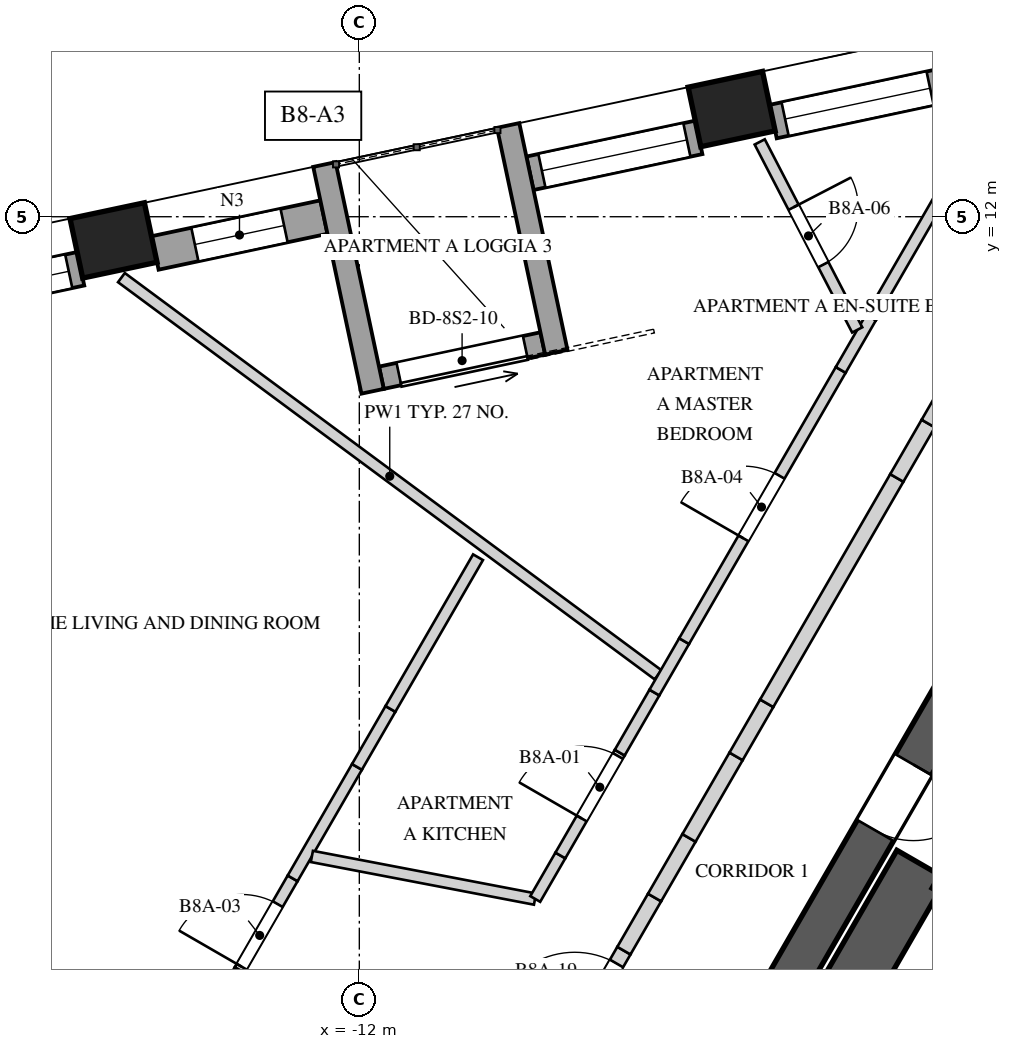
"""IFC4 building model, lengths in metres.
Left out: names, types, materials, properties, quantities, classifications, styles, units other than length and angle.
Written with IfcOpenShell. Run it as: python <this file> out.ifc"""

import sys

from ifc_helpers import new_model, si_unit, direction, frame, frame_2d, origin, origin_2d, place, context, subcontext, project, spatial, polyline, rectangle, outline, extrude, element, fill, save


model = new_model("IFC4")
c1 = context("Model", 3, precision=1e-05, world=origin(), true_north=direction((0.0, 1.0)))
c2 = subcontext(c1, "Body", "Model", "MODEL_VIEW")
j1 = project(units=[si_unit("LENGTHUNIT", "METRE"), si_unit("PLANEANGLEUNIT", "RADIAN")], contexts=[c1])
p1 = place(None, origin())
s1 = spatial("IfcSite", under=j1, at=p1, CompositionType="ELEMENT")
p2 = place(p1, origin())
s2 = spatial("IfcBuilding", under=s1, at=p2, CompositionType="ELEMENT")
p3 = place(p2, frame((0.0, 0.0, 320.4)))
s3 = spatial("IfcBuildingStorey", under=s2, at=p3, CompositionType="ELEMENT", Elevation=320.4)
p4 = place(p3, frame((-1.285, 10.725, 0.0), z_axis=(0.0, 0.0, 1.0), x_axis=(-0.499994590896, -0.86602852671, 0.0)))
e1 = element("IfcWall", 1, at=p4, inside=s3, PredefinedType="SHEAR", context=c2, shape_type="SweptSolid", body=[
    extrude(rectangle(XDim=17.292, YDim=0.55, at=frame_2d((8.646, 0.0))), origin(), (0.0, 0.0, 1.0), 4.0),
])
p5 = place(p4, frame((6.851, 0.0, 0.0)))
e2 = element("IfcOpeningElement", 2, at=p5, cuts=e1, PredefinedType="OPENING", context=c2, shape_type="SweptSolid", body=[
    extrude(rectangle(XDim=1.0, YDim=2.4, at=frame_2d((0.5, 1.2))), frame((0.0, 0.285, 0.0), z_axis=(0.0, -1.0, 0.0), x_axis=(1.0, 0.0, 0.0)), (0.0, 0.0, 1.0), 0.57),
])
p6 = place(p4, frame((15.089, 0.0, 0.0)))
e3 = element("IfcOpeningElement", 3, at=p6, cuts=e1, PredefinedType="OPENING", context=c2, shape_type="SweptSolid", body=[
    extrude(rectangle(XDim=0.8, YDim=2.1, at=frame_2d((0.4, 1.05))), frame((0.0, 0.285, 0.0), z_axis=(0.0, -1.0, 0.0), x_axis=(1.0, 0.0, 0.0)), (0.0, 0.0, 1.0), 0.57),
])
for number, where, z_axis, x_axis in (
    (4, (-7.102, 13.417, -0.35), (0.0, 0.0, 1.0), (-0.978, -0.208, 0.0)),
    (5, (-15.234, 11.688, -0.35), (0.0, 0.0, 1.0), (-0.978, -0.208, 0.0)),
):
    element("IfcColumn", number, at=place(p3, frame(where, z_axis=z_axis, x_axis=x_axis)), inside=s3, PredefinedType="COLUMN", context=c2, shape_type="SweptSolid", body=[
        extrude(rectangle(XDim=1.0, YDim=0.8, at=origin_2d()), origin(), (0.0, 0.0, 1.0), 4.35),
    ])
p7 = place(p3, frame((0.599, 14.772, 0.0), z_axis=(0.0, 0.0, 1.0), x_axis=(-0.978151299843, -0.207894287118, 0.0)))
e6 = element("IfcWall", 6, at=p7, inside=s3, PredefinedType="SOLIDWALL", context=c2, shape_type="SweptSolid", body=[
    extrude(rectangle(XDim=7.314, YDim=0.45, at=frame_2d((3.657, 0.0))), origin(), (0.0, 0.0, 1.0), 3.3),
])
p8 = place(p7, frame((0.161, 0.0, 0.4)))
e7 = element("IfcOpeningElement", 7, at=p8, cuts=e6, PredefinedType="OPENING", context=c2, shape_type="SweptSolid", body=[
    extrude(rectangle(XDim=1.95, YDim=2.75, at=frame_2d((0.975, 1.375))), frame((0.0, 0.235, 0.0), z_axis=(0.0, -1.0, 0.0), x_axis=(1.0, 0.0, 0.0)), (0.0, 0.0, 1.0), 0.47),
])
p9 = place(p7, frame((2.682, 0.0, 0.4)))
e8 = element("IfcOpeningElement", 8, at=p9, cuts=e6, PredefinedType="OPENING", context=c2, shape_type="SweptSolid", body=[
    extrude(rectangle(XDim=1.95, YDim=2.75, at=frame_2d((0.975, 1.375))), frame((0.0, 0.235, 0.0), z_axis=(0.0, -1.0, 0.0), x_axis=(1.0, 0.0, 0.0)), (0.0, 0.0, 1.0), 0.47),
])
p10 = place(p7, frame((5.203, 0.0, 0.4)))
e9 = element("IfcOpeningElement", 9, at=p10, cuts=e6, PredefinedType="OPENING", context=c2, shape_type="SweptSolid", body=[
    extrude(rectangle(XDim=1.95, YDim=2.75, at=frame_2d((0.975, 1.375))), frame((0.0, 0.235, 0.0), z_axis=(0.0, -1.0, 0.0), x_axis=(1.0, 0.0, 0.0)), (0.0, 0.0, 1.0), 0.47),
])
p11 = place(p3, frame((-7.533, 13.044, 0.0), z_axis=(0.0, 0.0, 1.0), x_axis=(-0.978153386925, -0.207884467067, 0.0)))
e10 = element("IfcWall", 10, at=p11, inside=s3, PredefinedType="SOLIDWALL", context=c2, shape_type="SweptSolid", body=[
    extrude(rectangle(XDim=2.271, YDim=0.45, at=frame_2d((1.136, 0.0))), origin(), (0.0, 0.0, 1.0), 3.3),
])
p12 = place(p11, frame((0.161, 0.0, 0.4)))
e11 = element("IfcOpeningElement", 11, at=p12, cuts=e10, PredefinedType="OPENING", context=c2, shape_type="SweptSolid", body=[
    extrude(rectangle(XDim=1.95, YDim=2.75, at=frame_2d((0.975, 1.375))), frame((0.0, 0.235, 0.0), z_axis=(0.0, -1.0, 0.0), x_axis=(1.0, 0.0, 0.0)), (0.0, 0.0, 1.0), 0.47),
])
p13 = place(p3, frame((-12.466, 11.995, 0.0), z_axis=(0.0, 0.0, 1.0), x_axis=(-0.978153386925, -0.207884467067, 0.0)))
e12 = element("IfcWall", 12, at=p13, inside=s3, PredefinedType="SOLIDWALL", context=c2, shape_type="SweptSolid", body=[
    extrude(rectangle(XDim=2.271, YDim=0.45, at=frame_2d((1.136, 0.0))), origin(), (0.0, 0.0, 1.0), 3.3),
])
p14 = place(p13, frame((0.536, 0.0, 0.4)))
e13 = element("IfcOpeningElement", 13, at=p14, cuts=e12, PredefinedType="OPENING", context=c2, shape_type="SweptSolid", body=[
    extrude(rectangle(XDim=1.2, YDim=2.75, at=frame_2d((0.6, 1.375))), frame((0.0, 0.235, 0.0), z_axis=(0.0, -1.0, 0.0), x_axis=(1.0, 0.0, 0.0)), (0.0, 0.0, 1.0), 0.47),
])
p15 = place(p3, frame((-15.666, 11.315, 0.0), z_axis=(0.0, 0.0, 1.0), x_axis=(-0.978148740936, -0.207906326516, 0.0)))
e14 = element("IfcWall", 14, at=p15, inside=s3, PredefinedType="SOLIDWALL", context=c2, shape_type="SweptSolid", body=[
    extrude(rectangle(XDim=2.271, YDim=0.45, at=frame_2d((1.135, 0.0))), origin(), (0.0, 0.0, 1.0), 3.3),
])
p16 = place(p15, frame((0.161, 0.0, 0.4)))
e15 = element("IfcOpeningElement", 15, at=p16, cuts=e14, PredefinedType="OPENING", context=c2, shape_type="SweptSolid", body=[
    extrude(rectangle(XDim=1.95, YDim=2.75, at=frame_2d((0.975, 1.375))), frame((0.0, 0.235, 0.0), z_axis=(0.0, -1.0, 0.0), x_axis=(1.0, 0.0, 0.0)), (0.0, 0.0, 1.0), 0.47),
])
p17 = place(p3, frame((-9.586, 10.333, 0.0), z_axis=(0.0, 0.0, 1.0), x_axis=(-0.978148276005, -0.207908513891, 0.0)))
e16 = element("IfcWall", 16, at=p17, inside=s3, PredefinedType="SOLIDWALL", context=c2, shape_type="SweptSolid", body=[
    extrude(rectangle(XDim=2.171, YDim=0.3, at=frame_2d((1.085, 0.0))), origin(), (0.0, 0.0, 1.0), 3.3),
])
p18 = place(p17, frame((0.236, 0.0, 0.0)))
e17 = element("IfcOpeningElement", 17, at=p18, cuts=e16, PredefinedType="OPENING", context=c2, shape_type="SweptSolid", body=[
    extrude(rectangle(XDim=1.7, YDim=2.5, at=frame_2d((0.85, 1.25))), frame((0.0, 0.16, 0.0), z_axis=(0.0, -1.0, 0.0), x_axis=(1.0, 0.0, 0.0)), (0.0, 0.0, 1.0), 0.32),
])
for number, where, z_axis, x_axis in (
    (18, (-10.042, 13.201, 0.0), (0.0, 0.0, 1.0), (0.208, -0.978, 0.0)),
    (19, (-12.459, 12.687, 0.0), (0.0, 0.0, 1.0), (0.208, -0.978, 0.0)),
):
    element("IfcWall", number, at=place(p3, frame(where, z_axis=z_axis, x_axis=x_axis)), inside=s3, PredefinedType="SOLIDWALL", context=c2, shape_type="SweptSolid", body=[
        extrude(rectangle(XDim=3.05, YDim=0.3, at=frame_2d((1.525, 0.0))), origin(), (0.0, 0.0, 1.0), 3.3),
    ])
p19 = place(p3, frame((-4.993, -2.648, 0.0), z_axis=(0.0, 0.0, 1.0), x_axis=(0.499996545922, 0.866027397988, 0.0)))
e20 = element("IfcWall", 20, at=p19, inside=s3, PredefinedType="SOLIDWALL", context=c2, shape_type="SweptSolid", body=[
    extrude(rectangle(XDim=5.5, YDim=0.2, at=frame_2d((2.75, 0.0))), origin(), (0.0, 0.0, 1.0), 3.65),
])
p20 = place(p19, frame((2.275, 0.0, 0.0)))
e21 = element("IfcOpeningElement", 21, at=p20, cuts=e20, PredefinedType="OPENING", context=c2, shape_type="SweptSolid", body=[
    extrude(rectangle(XDim=0.95, YDim=2.4, at=frame_2d((0.475, 1.2))), frame((0.0, 0.11, 0.0), z_axis=(0.0, -1.0, 0.0), x_axis=(1.0, 0.0, 0.0)), (0.0, 0.0, 1.0), 0.22),
])
p21 = place(p3, frame((-4.603, 3.477, 0.0), z_axis=(0.0, 0.0, 1.0), x_axis=(-0.500015767406, -0.866016300277, 0.0)))
e22 = element("IfcWall", 22, at=p21, inside=s3, PredefinedType="SOLIDWALL", context=c2, shape_type="SweptSolid", body=[
    extrude(rectangle(XDim=5.5, YDim=0.75, at=frame_2d((2.75, 0.0))), origin(), (0.0, 0.0, 1.0), 3.65),
])
p22 = place(p3, frame((-2.38, 2.078, 0.0), z_axis=(0.0, 0.0, 1.0), x_axis=(-0.866061024631, 0.499938297808, 0.0)))
e23 = element("IfcWall", 23, at=p22, inside=s3, PredefinedType="SOLIDWALL", context=c2, shape_type="SweptSolid", body=[
    extrude(rectangle(XDim=2.35, YDim=0.2, at=frame_2d((1.175, 0.0))), origin(), (0.0, 0.0, 1.0), 3.65),
])
p23 = place(p3, frame((-15.13, 11.199, 0.0), z_axis=(0.0, 0.0, 1.0), x_axis=(0.80377624172, -0.594931721499, 0.0)))
e24 = element("IfcWall", 24, at=p23, inside=s3, PredefinedType="PARTITIONING", context=c2, shape_type="SweptSolid", body=[
    extrude(rectangle(XDim=8.784, YDim=0.15, at=frame_2d((4.392, 0.0))), origin(), (0.0, 0.0, 1.0), 2.75),
])
p24 = place(p3, frame((-14.763, 0.03, 0.0), z_axis=(0.0, 0.0, 1.0), x_axis=(0.500045118629, 0.865999352965, 0.0)))
e25 = element("IfcWall", 25, at=p24, inside=s3, PredefinedType="PARTITIONING", context=c2, shape_type="SweptSolid", body=[
    extrude(rectangle(XDim=2.38, YDim=0.15, at=frame_2d((1.19, 0.0))), origin(), (0.0, 0.0, 1.0), 3.65),
])
p25 = place(p3, frame((-13.573, 2.09, 0.0), z_axis=(0.0, 0.0, 1.0), x_axis=(0.500026194733, 0.86601027972, 0.0)))
e26 = element("IfcWall", 26, at=p25, inside=s3, PredefinedType="PARTITIONING", context=c2, shape_type="SweptSolid", body=[
    extrude(outline(polyline([(0.0, 0.0), (1.392, 0.0), (1.392, 2.55), (0.474, 2.55), (0.474, 3.65), (0.0, 3.65), (0.0, 0.0)])), frame((0.0, 0.075, 0.0), z_axis=(0.0, -1.0, 0.0), x_axis=(1.0, 0.0, 0.0)), (0.0, 0.0, 1.0), 0.15),
])
p26 = place(p25, frame((0.05, 0.0, 0.0)))
e27 = element("IfcOpeningElement", 27, at=p26, cuts=e26, PredefinedType="OPENING", context=c2, shape_type="SweptSolid", body=[
    extrude(rectangle(XDim=0.95, YDim=2.4, at=frame_2d((0.475, 1.2))), frame((0.0, 0.085, 0.0), z_axis=(0.0, -1.0, 0.0), x_axis=(1.0, 0.0, 0.0)), (0.0, 0.0, 1.0), 0.17),
])
p27 = place(p3, frame((-12.877, 3.295, 0.0), z_axis=(0.0, 0.0, 1.0), x_axis=(0.499876388284, 0.86609675928, 0.0)))
e28 = element("IfcWall", 28, at=p27, inside=s3, PredefinedType="PARTITIONING", context=c2, shape_type="SweptSolid", body=[
    extrude(rectangle(XDim=1.693, YDim=0.15, at=frame_2d((0.847, 0.0))), origin(), (0.0, 0.0, 1.0), 3.65),
])
p28 = place(p3, frame((-12.031, 4.762, 0.0), z_axis=(0.0, 0.0, 1.0), x_axis=(0.50019444547, 0.865913111531, 0.0)))
e29 = element("IfcWall", 29, at=p28, inside=s3, PredefinedType="PARTITIONING", context=c2, shape_type="SweptSolid", body=[
    extrude(rectangle(XDim=0.881, YDim=0.15, at=frame_2d((0.44, 0.0))), origin(), (0.0, 0.0, 1.0), 2.55),
])
p29 = place(p3, frame((-11.591, 5.524, 0.0), z_axis=(0.0, 0.0, 1.0), x_axis=(0.500012835235, 0.866017993231, 0.0)))
e30 = element("IfcWall", 30, at=p29, inside=s3, PredefinedType="PARTITIONING", context=c2, shape_type="SweptSolid", body=[
    extrude(rectangle(XDim=2.305, YDim=0.15, at=frame_2d((1.152, 0.0))), origin(), (0.0, 0.0, 1.0), 3.65),
])
p30 = place(p3, frame((-12.624, 3.584, 0.0), z_axis=(0.0, 0.0, 1.0), x_axis=(0.982222548554, -0.187720177693, 0.0)))
e31 = element("IfcWall", 31, at=p30, inside=s3, PredefinedType="PARTITIONING", context=c2, shape_type="SweptSolid", body=[
    extrude(rectangle(XDim=2.989, YDim=0.15, at=frame_2d((1.494, 0.0))), origin(), (0.0, 0.0, 1.0), 3.65),
])
p31 = place(p3, frame((-9.686, 3.024, 0.0), z_axis=(0.0, 0.0, 1.0), x_axis=(0.500191429871, 0.865914853484, 0.0)))
e32 = element("IfcWall", 32, at=p31, inside=s3, PredefinedType="PARTITIONING", context=c2, shape_type="SweptSolid", body=[
    extrude(rectangle(XDim=0.661, YDim=0.15, at=frame_2d((0.331, 0.0))), origin(), (0.0, 0.0, 1.0), 3.65),
])
p32 = place(p3, frame((-9.355, 3.597, 0.0), z_axis=(0.0, 0.0, 1.0), x_axis=(0.499988530825, 0.866032025414, 0.0)))
e33 = element("IfcWall", 33, at=p32, inside=s3, PredefinedType="PARTITIONING", context=c2, shape_type="SweptSolid", body=[
    extrude(outline(polyline([(0.0, 0.0), (1.562, 0.0), (1.562, 3.65), (0.881, 3.65), (0.881, 2.55), (0.0, 2.55), (0.0, 0.0)])), frame((0.0, 0.075, 0.0), z_axis=(0.0, -1.0, 0.0), x_axis=(1.0, 0.0, 0.0)), (0.0, 0.0, 1.0), 0.15),
])
p33 = place(p32, frame((0.562, 0.0, 0.0)))
e34 = element("IfcOpeningElement", 34, at=p33, cuts=e33, PredefinedType="OPENING", context=c2, shape_type="SweptSolid", body=[
    extrude(rectangle(XDim=0.95, YDim=2.4, at=frame_2d((0.475, 1.2))), frame((0.0, 0.085, 0.0), z_axis=(0.0, -1.0, 0.0), x_axis=(1.0, 0.0, 0.0)), (0.0, 0.0, 1.0), 0.17),
])
p34 = place(p3, frame((-8.574, 4.949, 0.0), z_axis=(0.0, 0.0, 1.0), x_axis=(0.500023511883, 0.866011828767, 0.0)))
e35 = element("IfcWall", 35, at=p34, inside=s3, PredefinedType="PARTITIONING", context=c2, shape_type="SweptSolid", body=[
    extrude(rectangle(XDim=0.913, YDim=0.15, at=frame_2d((0.456, 0.0))), origin(), (0.0, 0.0, 1.0), 3.65),
])
p35 = place(p3, frame((-8.118, 5.74, 0.0), z_axis=(0.0, 0.0, 1.0), x_axis=(0.500001804394, 0.866024362014, 0.0)))
e36 = element("IfcWall", 36, at=p35, inside=s3, PredefinedType="PARTITIONING", context=c2, shape_type="SweptSolid", body=[
    extrude(rectangle(XDim=0.782, YDim=0.15, at=frame_2d((0.391, 0.0))), origin(), (0.0, 0.0, 1.0), 2.75),
])
p36 = place(p3, frame((-7.727, 6.417, 0.0), z_axis=(0.0, 0.0, 1.0), x_axis=(0.50002680699, 0.866009926209, 0.0)))
e37 = element("IfcWall", 37, at=p36, inside=s3, PredefinedType="PARTITIONING", context=c2, shape_type="SweptSolid", body=[
    extrude(rectangle(XDim=4.12, YDim=0.15, at=frame_2d((2.06, 0.0))), origin(), (0.0, 0.0, 1.0), 3.65),
])
p37 = place(p36, frame((1.561, 0.0, 0.0)))
e38 = element("IfcOpeningElement", 38, at=p37, cuts=e37, PredefinedType="OPENING", context=c2, shape_type="SweptSolid", body=[
    extrude(rectangle(XDim=0.95, YDim=2.4, at=frame_2d((0.475, 1.2))), frame((0.0, 0.085, 0.0), z_axis=(0.0, -1.0, 0.0), x_axis=(1.0, 0.0, 0.0)), (0.0, 0.0, 1.0), 0.17),
])
p38 = place(p3, frame((-5.667, 9.985, 0.0), z_axis=(0.0, 0.0, 1.0), x_axis=(0.499961121316, 0.86604784924, 0.0)))
e39 = element("IfcWall", 39, at=p38, inside=s3, PredefinedType="PARTITIONING", context=c2, shape_type="SweptSolid", body=[
    extrude(rectangle(XDim=0.797, YDim=0.15, at=frame_2d((0.398, 0.0))), origin(), (0.0, 0.0, 1.0), 2.95),
])
p39 = place(p3, frame((-5.268, 10.675, 0.0), z_axis=(0.0, 0.0, 1.0), x_axis=(0.499956642393, 0.866050434864, 0.0)))
e40 = element("IfcWall", 40, at=p39, inside=s3, PredefinedType="PARTITIONING", context=c2, shape_type="SweptSolid", body=[
    extrude(rectangle(XDim=2.256, YDim=0.15, at=frame_2d((1.128, 0.0))), origin(), (0.0, 0.0, 1.0), 3.65),
])
p40 = place(p3, frame((-6.732, 12.984, 0.0), z_axis=(0.0, 0.0, 1.0), x_axis=(0.460309491074, -0.887758510197, 0.0)))
e41 = element("IfcWall", 41, at=p40, inside=s3, PredefinedType="PARTITIONING", context=c2, shape_type="SweptSolid", body=[
    extrude(rectangle(XDim=2.786, YDim=0.15, at=frame_2d((1.393, 0.0))), origin(), (0.0, 0.0, 1.0), 2.95),
])
p41 = place(p40, frame((0.968, 0.0, 0.0)))
e42 = element("IfcOpeningElement", 42, at=p41, cuts=e41, PredefinedType="OPENING", context=c2, shape_type="SweptSolid", body=[
    extrude(rectangle(XDim=0.85, YDim=2.4, at=frame_2d((0.425, 1.2))), frame((0.0, 0.085, 0.0), z_axis=(0.0, -1.0, 0.0), x_axis=(1.0, 0.0, 0.0)), (0.0, 0.0, 1.0), 0.17),
])
p42 = place(p3, frame((-9.191, 1.18, 0.0), z_axis=(0.0, 0.0, 1.0), x_axis=(0.500005339912, 0.866022320763, 0.0)))
e43 = element("IfcWall", 43, at=p42, inside=s3, PredefinedType="SOLIDWALL", context=c2, shape_type="SweptSolid", body=[
    extrude(outline(polyline([(0.0, 0.0), (1.345, 0.0), (1.345, 2.55), (0.401, 2.55), (0.401, 3.65), (0.0, 3.65), (0.0, 0.0)])), frame((0.0, 0.1, 0.0), z_axis=(0.0, -1.0, 0.0), x_axis=(1.0, 0.0, 0.0)), (0.0, 0.0, 1.0), 0.2),
])
p43 = place(p42, frame((0.05, 0.0, 0.0)))
e44 = element("IfcOpeningElement", 44, at=p43, cuts=e43, PredefinedType="OPENING", context=c2, shape_type="SweptSolid", body=[
    extrude(rectangle(XDim=1.1, YDim=2.4, at=frame_2d((0.55, 1.2))), frame((0.0, 0.11, 0.0), z_axis=(0.0, -1.0, 0.0), x_axis=(1.0, 0.0, 0.0)), (0.0, 0.0, 1.0), 0.22),
])
p44 = place(p3, frame((-8.519, 2.344, 0.0), z_axis=(0.0, 0.0, 1.0), x_axis=(0.499914554297, 0.866074730264, 0.0)))
e45 = element("IfcWall", 45, at=p44, inside=s3, PredefinedType="SOLIDWALL", context=c2, shape_type="SweptSolid", body=[
    extrude(rectangle(XDim=0.807, YDim=0.2, at=frame_2d((0.403, 0.0))), origin(), (0.0, 0.0, 1.0), 3.65),
])
p45 = place(p3, frame((-8.116, 3.043, 0.0), z_axis=(0.0, 0.0, 1.0), x_axis=(0.499994660107, 0.866028486751, 0.0)))
e46 = element("IfcWall", 46, at=p45, inside=s3, PredefinedType="SOLIDWALL", context=c2, shape_type="SweptSolid", body=[
    extrude(rectangle(XDim=0.906, YDim=0.2, at=frame_2d((0.453, 0.0))), origin(), (0.0, 0.0, 1.0), 2.55),
])
p46 = place(p3, frame((-7.663, 3.828, 0.0), z_axis=(0.0, 0.0, 1.0), x_axis=(0.499955681623, 0.866050989499, 0.0)))
e47 = element("IfcWall", 47, at=p46, inside=s3, PredefinedType="SOLIDWALL", context=c2, shape_type="SweptSolid", body=[
    extrude(rectangle(XDim=1.238, YDim=0.2, at=frame_2d((0.619, 0.0))), origin(), (0.0, 0.0, 1.0), 3.65),
])
p47 = place(p3, frame((-7.044, 4.9, 0.0), z_axis=(0.0, 0.0, 1.0), x_axis=(0.500141487433, 0.865943700565, 0.0)))
e48 = element("IfcWall", 48, at=p47, inside=s3, PredefinedType="SOLIDWALL", context=c2, shape_type="SweptSolid", body=[
    extrude(rectangle(XDim=0.807, YDim=0.2, at=frame_2d((0.403, 0.0))), origin(), (0.0, 0.0, 1.0), 2.75),
])
p48 = place(p3, frame((-6.64, 5.599, 0.0), z_axis=(0.0, 0.0, 1.0), x_axis=(0.499989998285, 0.8660311782, 0.0)))
e49 = element("IfcWall", 49, at=p48, inside=s3, PredefinedType="SOLIDWALL", context=c2, shape_type="SweptSolid", body=[
    extrude(rectangle(XDim=3.423, YDim=0.2, at=frame_2d((1.711, 0.0))), origin(), (0.0, 0.0, 1.0), 3.65),
])
p49 = place(p3, frame((-4.929, 8.563, 0.0), z_axis=(0.0, 0.0, 1.0), x_axis=(0.500046299512, 0.865998671098, 0.0)))
e50 = element("IfcWall", 50, at=p49, inside=s3, PredefinedType="SOLIDWALL", context=c2, shape_type="SweptSolid", body=[
    extrude(rectangle(XDim=0.827, YDim=0.2, at=frame_2d((0.413, 0.0))), origin(), (0.0, 0.0, 1.0), 2.95),
])
p50 = place(p3, frame((-4.515, 9.279, 0.0), z_axis=(0.0, 0.0, 1.0), x_axis=(0.499975428181, 0.866039589866, 0.0)))
e51 = element("IfcWall", 51, at=p50, inside=s3, PredefinedType="SOLIDWALL", context=c2, shape_type="SweptSolid", body=[
    extrude(rectangle(XDim=4.066, YDim=0.2, at=frame_2d((2.033, 0.0))), origin(), (0.0, 0.0, 1.0), 3.65),
])
p51 = place(p10, origin())
e52 = element("IfcWindow", 52, at=p51, inside=s3, PartitioningType="SINGLE_PANEL", PredefinedType="WINDOW", context=c2, shape_type="SweptSolid", body=[
    extrude(rectangle(XDim=1.95, YDim=2.75, at=frame_2d((0.975, 1.375))), frame((0.0, 0.03, 0.0), z_axis=(0.0, -1.0, 0.0), x_axis=(1.0, 0.0, 0.0)), (0.0, 0.0, 1.0), 0.06),
])
fill(e9, e52)
p52 = place(p12, origin())
e53 = element("IfcWindow", 53, at=p52, inside=s3, PartitioningType="SINGLE_PANEL", PredefinedType="WINDOW", context=c2, shape_type="SweptSolid", body=[
    extrude(rectangle(XDim=1.95, YDim=2.75, at=frame_2d((0.975, 1.375))), frame((0.0, 0.03, 0.0), z_axis=(0.0, -1.0, 0.0), x_axis=(1.0, 0.0, 0.0)), (0.0, 0.0, 1.0), 0.06),
])
fill(e11, e53)
p53 = place(p14, origin())
e54 = element("IfcWindow", 54, at=p53, inside=s3, PartitioningType="SINGLE_PANEL", PredefinedType="WINDOW", context=c2, shape_type="SweptSolid", body=[
    extrude(rectangle(XDim=1.2, YDim=2.75, at=frame_2d((0.6, 1.375))), frame((0.0, 0.03, 0.0), z_axis=(0.0, -1.0, 0.0), x_axis=(1.0, 0.0, 0.0)), (0.0, 0.0, 1.0), 0.06),
])
fill(e13, e54)
p54 = place(p16, origin())
e55 = element("IfcWindow", 55, at=p54, inside=s3, PartitioningType="SINGLE_PANEL", PredefinedType="WINDOW", context=c2, shape_type="SweptSolid", body=[
    extrude(rectangle(XDim=1.95, YDim=2.75, at=frame_2d((0.975, 1.375))), frame((0.0, 0.03, 0.0), z_axis=(0.0, -1.0, 0.0), x_axis=(1.0, 0.0, 0.0)), (0.0, 0.0, 1.0), 0.06),
])
fill(e15, e55)
p55 = place(p18, origin())
e56 = element("IfcDoor", 56, at=p55, inside=s3, OperationType="SLIDING_TO_LEFT", PredefinedType="DOOR", context=c2, shape_type="SweptSolid", body=[
    extrude(rectangle(XDim=1.7, YDim=2.5, at=frame_2d((0.85, 1.25))), frame((0.0, 0.025, 0.0), z_axis=(0.0, -1.0, 0.0), x_axis=(1.0, 0.0, 0.0)), (0.0, 0.0, 1.0), 0.05),
])
fill(e17, e56)
p56 = place(p5, origin())
e57 = element("IfcDoor", 57, at=p56, inside=s3, OperationType="SINGLE_SWING_LEFT", PredefinedType="DOOR", context=c2, shape_type="SweptSolid", body=[
    extrude(rectangle(XDim=1.0, YDim=2.4, at=frame_2d((0.5, 1.2))), frame((0.0, 0.025, 0.0), z_axis=(0.0, -1.0, 0.0), x_axis=(1.0, 0.0, 0.0)), (0.0, 0.0, 1.0), 0.05),
])
fill(e2, e57)
p57 = place(p33, origin())
e58 = element("IfcDoor", 58, at=p57, inside=s3, OperationType="SINGLE_SWING_LEFT", PredefinedType="DOOR", context=c2, shape_type="SweptSolid", body=[
    extrude(rectangle(XDim=0.95, YDim=2.4, at=frame_2d((0.475, 1.2))), frame((0.0, 0.025, 0.0), z_axis=(0.0, -1.0, 0.0), x_axis=(1.0, 0.0, 0.0)), (0.0, 0.0, 1.0), 0.05),
])
fill(e34, e58)
p58 = place(p26, origin())
e59 = element("IfcDoor", 59, at=p58, inside=s3, OperationType="SINGLE_SWING_LEFT", PredefinedType="DOOR", context=c2, shape_type="SweptSolid", body=[
    extrude(rectangle(XDim=0.95, YDim=2.4, at=frame_2d((0.475, 1.2))), frame((0.0, 0.025, 0.0), z_axis=(0.0, -1.0, 0.0), x_axis=(1.0, 0.0, 0.0)), (0.0, 0.0, 1.0), 0.05),
])
fill(e27, e59)
p59 = place(p37, origin())
e60 = element("IfcDoor", 60, at=p59, inside=s3, OperationType="SINGLE_SWING_RIGHT", PredefinedType="DOOR", context=c2, shape_type="SweptSolid", body=[
    extrude(rectangle(XDim=0.95, YDim=2.4, at=frame_2d((0.475, 1.2))), frame((0.0, 0.025, 0.0), z_axis=(0.0, -1.0, 0.0), x_axis=(1.0, 0.0, 0.0)), (0.0, 0.0, 1.0), 0.05),
])
fill(e38, e60)
p60 = place(p41, origin())
e61 = element("IfcDoor", 61, at=p60, inside=s3, OperationType="SINGLE_SWING_RIGHT", PredefinedType="DOOR", context=c2, shape_type="SweptSolid", body=[
    extrude(rectangle(XDim=0.85, YDim=2.4, at=frame_2d((0.425, 1.2))), frame((0.0, 0.025, 0.0), z_axis=(0.0, -1.0, 0.0), x_axis=(1.0, 0.0, 0.0)), (0.0, 0.0, 1.0), 0.05),
])
fill(e42, e61)
p61 = place(p43, origin())
e62 = element("IfcDoor", 62, at=p61, inside=s3, OperationType="SINGLE_SWING_LEFT", PredefinedType="DOOR", context=c2, shape_type="SweptSolid", body=[
    extrude(rectangle(XDim=1.1, YDim=2.4, at=frame_2d((0.55, 1.2))), frame((0.0, 0.025, 0.0), z_axis=(0.0, -1.0, 0.0), x_axis=(1.0, 0.0, 0.0)), (0.0, 0.0, 1.0), 0.05),
])
fill(e44, e62)
save(model, sys.argv[1])
